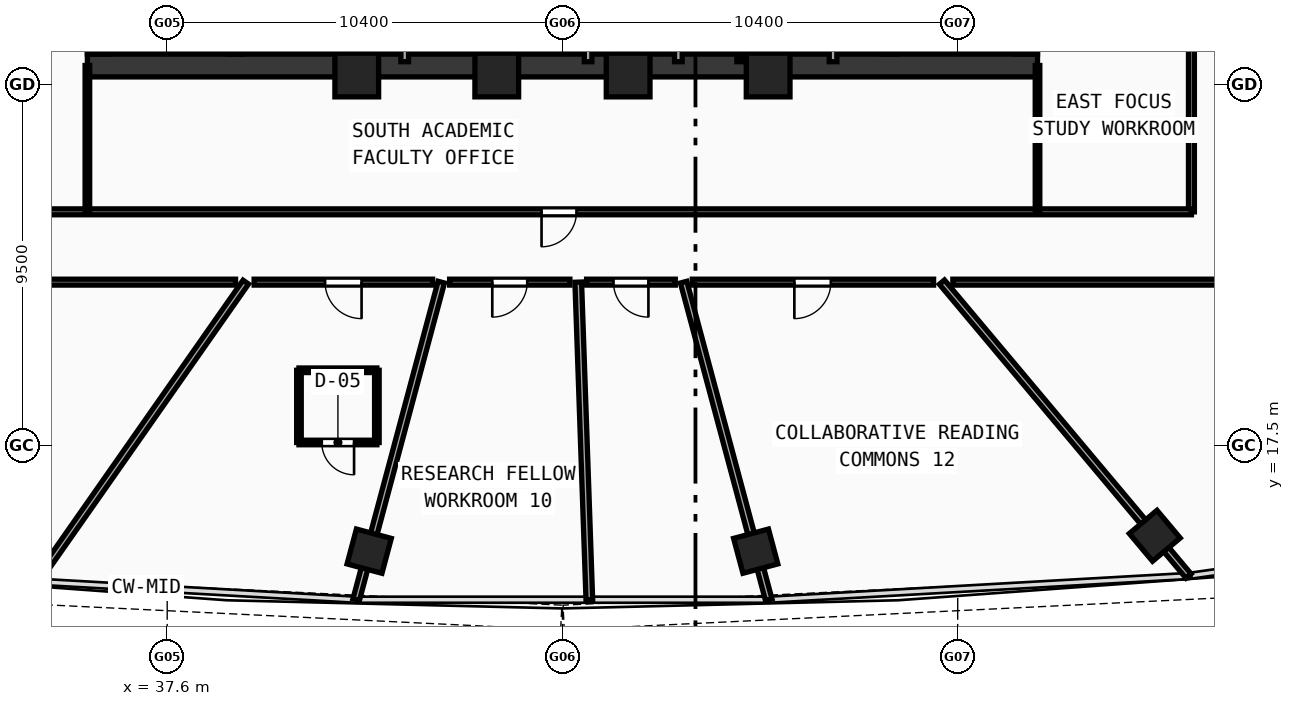
"""IFC4 building model, lengths in metres.
Left out: names, types, materials, properties, quantities, classifications, styles, units other than length and angle.
Written with IfcOpenShell. Run it as: python <this file> out.ifc"""

import sys

from ifc_helpers import new_model, si_unit, direction, frame, frame_2d, origin, origin_with_axes, origin_2d, place, context, subcontext, project, spatial, rectangle, hollow_rectangle, extrude, source, transform, mapped, element, fill, save


model = new_model("IFC4")
c1 = context("Model", 3, precision=1e-05, world=origin(), true_north=direction((0.0, 1.0)))
c2 = subcontext(c1, "Body", "Model", "MODEL_VIEW")
j1 = project(units=[si_unit("LENGTHUNIT", "METRE"), si_unit("PLANEANGLEUNIT", "RADIAN")], contexts=[c1])
p1 = place(None, origin())
s1 = spatial("IfcSite", under=j1, at=p1, CompositionType="ELEMENT")
p2 = place(p1, origin())
s2 = spatial("IfcBuilding", under=s1, at=p2, CompositionType="ELEMENT")
p3 = place(p2, frame((0.0, 0.0, 151.91)))
s3 = spatial("IfcBuildingStorey", under=s2, at=p3, CompositionType="ELEMENT", Elevation=151.91)
p4 = place(p3, frame((35.5, 27.5, 0.0), z_axis=(0.0, 0.0, 1.0), x_axis=(1.0, 0.0, 0.0)))
e1 = element("IfcWall", 1, at=p4, inside=s3, PredefinedType="SHEAR", context=c2, shape_type="SweptSolid", body=[
    extrude(rectangle(XDim=25.0, YDim=0.6, at=frame_2d((12.5, 0.0))), origin(), (0.0, 0.0, 1.0), 3.42),
])
for number, where, z_axis, x_axis in (
    (2, (35.8, 27.8, 0.0), (0.0, 0.0, 1.0), (0.0, 1.0, 0.0)),
    (3, (60.2, 27.8, 0.0), (0.0, 0.0, 1.0), (0.0, 1.0, 0.0)),
):
    element("IfcWall", number, at=place(p3, frame(where, z_axis=z_axis, x_axis=x_axis)), inside=s3, PredefinedType="SHEAR", context=c2, shape_type="SweptSolid", body=[
        extrude(rectangle(XDim=12.1, YDim=0.6, at=frame_2d((6.05, 0.0))), origin(), (0.0, 0.0, 1.0), 3.42),
    ])
p5 = place(p3, frame((39.4, 27.8, 0.0), z_axis=(0.0, 0.0, 1.0), x_axis=(0.0, 1.0, 0.0)))
e4 = element("IfcWall", 4, at=p5, inside=s3, PredefinedType="SHEAR", context=c2, shape_type="SweptSolid", body=[
    extrude(rectangle(XDim=12.1, YDim=0.4, at=frame_2d((6.05, 0.0))), origin(), (0.0, 0.0, 1.0), 3.42),
])
p6 = place(p5, frame((9.95, 0.0, 0.0)))
e5 = element("IfcOpeningElement", 5, at=p6, cuts=e4, PredefinedType="OPENING", context=c2, shape_type="SweptSolid", body=[
    extrude(rectangle(XDim=1.1, YDim=2.1, at=frame_2d((0.55, 1.05))), frame((0.0, 0.21, 0.0), z_axis=(0.0, -1.0, 0.0), x_axis=(1.0, 0.0, 0.0)), (0.0, 0.0, 1.0), 0.42),
])
p7 = place(p3, frame((56.6, 27.8, 0.0), z_axis=(0.0, 0.0, 1.0), x_axis=(0.0, 1.0, 0.0)))
e6 = element("IfcWall", 6, at=p7, inside=s3, PredefinedType="SHEAR", context=c2, shape_type="SweptSolid", body=[
    extrude(rectangle(XDim=12.1, YDim=0.4, at=frame_2d((6.05, 0.0))), origin(), (0.0, 0.0, 1.0), 3.42),
])
p8 = place(p7, frame((9.95, 0.0, 0.0)))
e7 = element("IfcOpeningElement", 7, at=p8, cuts=e6, PredefinedType="OPENING", context=c2, shape_type="SweptSolid", body=[
    extrude(rectangle(XDim=1.1, YDim=2.1, at=frame_2d((0.55, 1.05))), frame((0.0, 0.21, 0.0), z_axis=(0.0, -1.0, 0.0), x_axis=(1.0, 0.0, 0.0)), (0.0, 0.0, 1.0), 0.42),
])
m1 = source(origin(), c2, "Body", "SweptSolid", [
    extrude(hollow_rectangle(XDim=1.15, YDim=1.15, WallThickness=0.048, at=origin_2d()), origin(), (0.0, 0.0, 1.0), 3.68),
])
for number, where, z_axis, x_axis in (
    (8, (42.588, 27.25, -0.26), (0.0, 0.0, 1.0), (1.0, 0.0, 0.0)),
    (9, (46.272, 27.25, -0.26), (0.0, 0.0, 1.0), (1.0, 0.0, 0.0)),
    (10, (49.729, 27.25, -0.26), (0.0, 0.0, 1.0), (1.0, 0.0, 0.0)),
    (11, (53.412, 27.25, -0.26), (0.0, 0.0, 1.0), (1.0, 0.0, 0.0)),
):
    element("IfcColumn", number, at=place(p3, frame(where, z_axis=z_axis, x_axis=x_axis)), inside=s3, PredefinedType="COLUMN", context=c2, shape_type="MappedRepresentation", body=[
        mapped(m1, transform((0.0, 0.0, 0.0), scale=1.0)),
    ])
m2 = source(origin(), c2, "Body", "SweptSolid", [
    extrude(hollow_rectangle(XDim=0.95, YDim=0.95, WallThickness=0.04, at=origin_2d()), origin(), (0.0, 0.0, 1.0), 3.68),
])
for number, where, z_axis, x_axis in (
    (12, (42.915, 14.722, -0.26), (0.0, 0.0, 1.0), (0.966, -0.259, 0.0)),
    (13, (53.085, 14.722, -0.26), (0.0, 0.0, 1.0), (0.966, 0.259, 0.0)),
    (14, (63.585, 15.126, -0.26), (0.0, 0.0, 1.0), (0.766, 0.643, 0.0)),
):
    element("IfcColumn", number, at=place(p3, frame(where, z_axis=z_axis, x_axis=x_axis)), inside=s3, PredefinedType="COLUMN", context=c2, shape_type="MappedRepresentation", body=[
        mapped(m2, transform((0.0, 0.0, 0.0), scale=1.0)),
    ])
p9 = place(p3, frame((43.85, 27.6, 0.0), z_axis=(0.0, 0.0, 1.0), x_axis=(0.0, 1.0, 0.0)))
e15 = element("IfcWall", 15, at=p9, inside=s3, PredefinedType="SOLIDWALL", context=c2, shape_type="SweptSolid", body=[
    extrude(rectangle(XDim=6.22, YDim=0.2, at=frame_2d((3.11, 0.0))), origin(), (0.0, 0.0, 1.0), 3.42),
])
p10 = place(p9, frame((2.25, 0.0, 0.0)))
e16 = element("IfcOpeningElement", 16, at=p10, cuts=e15, PredefinedType="OPENING", context=c2, shape_type="SweptSolid", body=[
    extrude(rectangle(XDim=1.05, YDim=2.1, at=frame_2d((0.525, 1.05))), frame((0.0, 0.11, 0.0), z_axis=(0.0, -1.0, 0.0), x_axis=(1.0, 0.0, 0.0)), (0.0, 0.0, 1.0), 0.22),
])
p11 = place(p3, frame((53.68, 27.6, 0.0), z_axis=(0.0, 0.0, 1.0), x_axis=(0.0, 1.0, 0.0)))
e17 = element("IfcWall", 17, at=p11, inside=s3, PredefinedType="SOLIDWALL", context=c2, shape_type="SweptSolid", body=[
    extrude(rectangle(XDim=9.05, YDim=0.2, at=frame_2d((4.525, 0.0))), origin(), (0.0, 0.0, 1.0), 3.42),
])
p12 = place(p11, frame((6.9, 0.0, 0.0)))
e18 = element("IfcOpeningElement", 18, at=p12, cuts=e17, PredefinedType="OPENING", context=c2, shape_type="SweptSolid", body=[
    extrude(rectangle(XDim=1.05, YDim=2.1, at=frame_2d((0.525, 1.05))), frame((0.0, 0.11, 0.0), z_axis=(0.0, -1.0, 0.0), x_axis=(1.0, 0.0, 0.0)), (0.0, 0.0, 1.0), 0.22),
])
for number, where, z_axis, x_axis in (
    (19, (51.05, 27.6, 0.0), (0.0, 0.0, 1.0), (0.0, 1.0, 0.0)),
    (20, (46.225, 27.6, 0.0), (0.0, 0.0, 1.0), (0.0, 1.0, 0.0)),
    (21, (48.675, 27.6, 0.0), (0.0, 0.0, 1.0), (0.0, 1.0, 0.0)),
    (22, (55.12, 27.6, 0.0), (0.0, 0.0, 1.0), (0.0, 1.0, 0.0)),
):
    element("IfcWall", number, at=place(p3, frame(where, z_axis=z_axis, x_axis=x_axis)), inside=s3, PredefinedType="SOLIDWALL", context=c2, shape_type="SweptSolid", body=[
        extrude(rectangle(XDim=2.12, YDim=0.2, at=frame_2d((1.06, 0.0))), origin(), (0.0, 0.0, 1.0), 3.42),
    ])
p13 = place(p3, frame((42.32, 27.6, 0.0), z_axis=(0.0, 0.0, 1.0), x_axis=(0.0, 1.0, 0.0)))
e23 = element("IfcWall", 23, at=p13, inside=s3, PredefinedType="PARTITIONING", context=c2, shape_type="SweptSolid", body=[
    extrude(rectangle(XDim=5.9, YDim=0.155, at=frame_2d((2.95, 0.0))), origin(), (0.0, 0.0, 1.0), 3.42),
])
p14 = place(p13, frame((1.4, 0.0, 0.0)))
e24 = element("IfcOpeningElement", 24, at=p14, cuts=e23, PredefinedType="OPENING", context=c2, shape_type="SweptSolid", body=[
    extrude(rectangle(XDim=0.9, YDim=2.1, at=frame_2d((0.45, 1.05))), frame((0.0, 0.087, 0.0), z_axis=(0.0, -1.0, 0.0), x_axis=(1.0, 0.0, 0.0)), (0.0, 0.0, 1.0), 0.175),
])
p15 = place(p13, frame((4.45, 0.0, 0.0)))
e25 = element("IfcOpeningElement", 25, at=p15, cuts=e23, PredefinedType="OPENING", context=c2, shape_type="SweptSolid", body=[
    extrude(rectangle(XDim=0.9, YDim=2.1, at=frame_2d((0.45, 1.05))), frame((0.0, 0.087, 0.0), z_axis=(0.0, -1.0, 0.0), x_axis=(1.0, 0.0, 0.0)), (0.0, 0.0, 1.0), 0.175),
])
p16 = place(p3, frame((52.65, 27.6, 0.0), z_axis=(0.0, 0.0, 1.0), x_axis=(0.0, 1.0, 0.0)))
e26 = element("IfcWall", 26, at=p16, inside=s3, PredefinedType="PARTITIONING", context=c2, shape_type="SweptSolid", body=[
    extrude(rectangle(XDim=2.12, YDim=0.12, at=frame_2d((1.06, 0.0))), origin(), (0.0, 0.0, 1.0), 3.42),
])
p17 = place(p3, frame((64.55, 23.65, 0.0), z_axis=(0.0, 0.0, 1.0), x_axis=(0.0, 1.0, 0.0)))
e27 = element("IfcWall", 27, at=p17, inside=s3, PredefinedType="PARTITIONING", context=c2, shape_type="SweptSolid", body=[
    extrude(rectangle(XDim=16.6, YDim=0.155, at=frame_2d((8.3, 0.0))), origin(), (0.0, 0.0, 1.0), 2.77),
])
p18 = place(p17, frame((7.5, 0.0, 0.0)))
e28 = element("IfcOpeningElement", 28, at=p18, cuts=e27, PredefinedType="OPENING", context=c2, shape_type="SweptSolid", body=[
    extrude(rectangle(XDim=0.9, YDim=2.08, at=frame_2d((0.45, 1.04))), frame((0.0, 0.087, 0.0), z_axis=(0.0, -1.0, 0.0), x_axis=(1.0, 0.0, 0.0)), (0.0, 0.0, 1.0), 0.175),
])
p19 = place(p3, frame((31.45, 23.65, 0.0), z_axis=(0.0, 0.0, 1.0), x_axis=(1.0, 0.0, 0.0)))
e29 = element("IfcWall", 29, at=p19, inside=s3, PredefinedType="PARTITIONING", context=c2, shape_type="SweptSolid", body=[
    extrude(rectangle(XDim=33.1, YDim=0.155, at=frame_2d((16.55, 0.0))), origin(), (0.0, 0.0, 1.0), 2.77),
])
p20 = place(p19, frame((16.0, 0.0, 0.0)))
e30 = element("IfcOpeningElement", 30, at=p20, cuts=e29, PredefinedType="OPENING", context=c2, shape_type="SweptSolid", body=[
    extrude(rectangle(XDim=0.92, YDim=2.1, at=frame_2d((0.46, 1.05))), frame((0.0, 0.087, 0.0), z_axis=(0.0, -1.0, 0.0), x_axis=(1.0, 0.0, 0.0)), (0.0, 0.0, 1.0), 0.175),
])
for number, where, z_axis, x_axis in (
    (31, (35.5, 23.65, 0.0), (0.0, 0.0, 1.0), (0.0, 1.0, 0.0)),
    (32, (60.5, 23.65, 0.0), (0.0, 0.0, 1.0), (0.0, 1.0, 0.0)),
):
    element("IfcWall", number, at=place(p3, frame(where, z_axis=z_axis, x_axis=x_axis)), inside=s3, PredefinedType="PARTITIONING", context=c2, shape_type="SweptSolid", body=[
        extrude(rectangle(XDim=3.85, YDim=0.12, at=frame_2d((1.925, 0.0))), origin(), (0.0, 0.0, 1.0), 3.02),
    ])
p21 = place(p3, frame((39.667, 21.8, 0.0), z_axis=(0.0, 0.0, 1.0), x_axis=(-0.573578164834, -0.81915083399, 0.0)))
e33 = element("IfcWall", 33, at=p21, inside=s3, PredefinedType="PARTITIONING", context=c2, shape_type="SweptSolid", body=[
    extrude(rectangle(XDim=9.62, YDim=0.175, at=frame_2d((4.81, 0.0))), origin(), (0.0, 0.0, 1.0), 2.77),
])
p22 = place(p3, frame((44.811, 21.8, 0.0), z_axis=(0.0, 0.0, 1.0), x_axis=(-0.258790159725, -0.96593356564, 0.0)))
e34 = element("IfcWall", 34, at=p22, inside=s3, PredefinedType="PARTITIONING", context=c2, shape_type="SweptSolid", body=[
    extrude(rectangle(XDim=8.651, YDim=0.175, at=frame_2d((4.325, 0.0))), origin(), (0.0, 0.0, 1.0), 2.77),
])
p23 = place(p3, frame((48.416, 21.8, 0.0), z_axis=(0.0, 0.0, 1.0), x_axis=(0.034921859784, -0.999390045833, 0.0)))
e35 = element("IfcWall", 35, at=p23, inside=s3, PredefinedType="PARTITIONING", context=c2, shape_type="SweptSolid", body=[
    extrude(rectangle(XDim=8.361, YDim=0.175, at=frame_2d((4.181, 0.0))), origin(), (0.0, 0.0, 1.0), 2.77),
])
p24 = place(p3, frame((51.189, 21.8, 0.0), z_axis=(0.0, 0.0, 1.0), x_axis=(0.258790159725, -0.96593356564, 0.0)))
e36 = element("IfcWall", 36, at=p24, inside=s3, PredefinedType="PARTITIONING", context=c2, shape_type="SweptSolid", body=[
    extrude(rectangle(XDim=8.651, YDim=0.175, at=frame_2d((4.325, 0.0))), origin(), (0.0, 0.0, 1.0), 2.77),
])
p25 = place(p3, frame((57.985, 21.8, 0.0), z_axis=(0.0, 0.0, 1.0), x_axis=(0.642793186641, -0.766039763464, 0.0)))
e37 = element("IfcWall", 37, at=p25, inside=s3, PredefinedType="PARTITIONING", context=c2, shape_type="SweptSolid", body=[
    extrude(rectangle(XDim=10.093, YDim=0.175, at=frame_2d((5.046, 0.0))), origin(), (0.0, 0.0, 1.0), 2.77),
])
p26 = place(p3, frame((66.4, 21.8, 0.0), z_axis=(0.0, 0.0, 1.0), x_axis=(-1.0, 0.0, 0.0)))
e38 = element("IfcWall", 38, at=p26, inside=s3, PredefinedType="PARTITIONING", context=c2, shape_type="SweptSolid", body=[
    extrude(rectangle(XDim=8.127, YDim=0.155, at=frame_2d((4.064, 0.0))), origin(), (0.0, 0.0, 1.0), 3.02),
])
p27 = place(p3, frame((57.765, 21.8, 0.0), z_axis=(0.0, 0.0, 1.0), x_axis=(-1.0, 0.0, 0.0)))
e39 = element("IfcWall", 39, at=p27, inside=s3, PredefinedType="PARTITIONING", context=c2, shape_type="SweptSolid", body=[
    extrude(rectangle(XDim=6.349, YDim=0.155, at=frame_2d((3.174, 0.0))), origin(), (0.0, 0.0, 1.0), 2.77),
])
p28 = place(p27, frame((2.703, 0.0, 0.0)))
e40 = element("IfcOpeningElement", 40, at=p28, cuts=e39, PredefinedType="OPENING", context=c2, shape_type="SweptSolid", body=[
    extrude(rectangle(XDim=0.96, YDim=2.12, at=frame_2d((0.48, 1.06))), frame((0.0, 0.087, 0.0), z_axis=(0.0, -1.0, 0.0), x_axis=(1.0, 0.0, 0.0)), (0.0, 0.0, 1.0), 0.175),
])
p29 = place(p3, frame((50.969, 21.8, 0.0), z_axis=(0.0, 0.0, 1.0), x_axis=(-1.0, 0.0, 0.0)))
e41 = element("IfcWall", 41, at=p29, inside=s3, PredefinedType="PARTITIONING", context=c2, shape_type="SweptSolid", body=[
    extrude(rectangle(XDim=2.333, YDim=0.155, at=frame_2d((1.167, 0.0))), origin(), (0.0, 0.0, 1.0), 3.42),
])
p30 = place(p29, frame((0.707, 0.0, 0.0)))
e42 = element("IfcOpeningElement", 42, at=p30, cuts=e41, PredefinedType="OPENING", context=c2, shape_type="SweptSolid", body=[
    extrude(rectangle(XDim=0.92, YDim=2.1, at=frame_2d((0.46, 1.05))), frame((0.0, 0.087, 0.0), z_axis=(0.0, -1.0, 0.0), x_axis=(1.0, 0.0, 0.0)), (0.0, 0.0, 1.0), 0.175),
])
p31 = place(p3, frame((48.196, 21.8, 0.0), z_axis=(0.0, 0.0, 1.0), x_axis=(-1.0, 0.0, 0.0)))
e43 = element("IfcWall", 43, at=p31, inside=s3, PredefinedType="PARTITIONING", context=c2, shape_type="SweptSolid", body=[
    extrude(rectangle(XDim=3.165, YDim=0.155, at=frame_2d((1.582, 0.0))), origin(), (0.0, 0.0, 1.0), 3.42),
])
p32 = place(p31, frame((1.122, 0.0, 0.0)))
e44 = element("IfcOpeningElement", 44, at=p32, cuts=e43, PredefinedType="OPENING", context=c2, shape_type="SweptSolid", body=[
    extrude(rectangle(XDim=0.92, YDim=2.1, at=frame_2d((0.46, 1.05))), frame((0.0, 0.087, 0.0), z_axis=(0.0, -1.0, 0.0), x_axis=(1.0, 0.0, 0.0)), (0.0, 0.0, 1.0), 0.175),
])
p33 = place(p3, frame((44.583, 21.8, 0.0), z_axis=(0.0, 0.0, 1.0), x_axis=(-1.0, 0.0, 0.0)))
e45 = element("IfcWall", 45, at=p33, inside=s3, PredefinedType="PARTITIONING", context=c2, shape_type="SweptSolid", body=[
    extrude(rectangle(XDim=4.696, YDim=0.155, at=frame_2d((2.348, 0.0))), origin(), (0.0, 0.0, 1.0), 3.42),
])
p34 = place(p33, frame((1.869, 0.0, 0.0)))
e46 = element("IfcOpeningElement", 46, at=p34, cuts=e45, PredefinedType="OPENING", context=c2, shape_type="SweptSolid", body=[
    extrude(rectangle(XDim=0.96, YDim=2.12, at=frame_2d((0.48, 1.06))), frame((0.0, 0.087, 0.0), z_axis=(0.0, -1.0, 0.0), x_axis=(1.0, 0.0, 0.0)), (0.0, 0.0, 1.0), 0.175),
])
p35 = place(p3, frame((39.399, 21.8, 0.0), z_axis=(0.0, 0.0, 1.0), x_axis=(-1.0, 0.0, 0.0)))
e47 = element("IfcWall", 47, at=p35, inside=s3, PredefinedType="PARTITIONING", context=c2, shape_type="SweptSolid", body=[
    extrude(rectangle(XDim=9.799, YDim=0.155, at=frame_2d((4.899, 0.0))), origin(), (0.0, 0.0, 1.0), 2.77),
])
p36 = place(p3, frame((41.067, 17.581, 0.0), z_axis=(0.0, 0.0, 1.0), x_axis=(1.0, 0.0, 0.0)))
e48 = element("IfcWall", 48, at=p36, inside=s3, PredefinedType="PARTITIONING", context=c2, shape_type="SweptSolid", body=[
    extrude(rectangle(XDim=2.05, YDim=0.12, at=frame_2d((1.025, 0.0))), origin(), (0.0, 0.0, 1.0), 3.42),
])
p37 = place(p36, frame((0.6, 0.0, 0.0)))
e49 = element("IfcOpeningElement", 49, at=p37, cuts=e48, PredefinedType="OPENING", context=c2, shape_type="SweptSolid", body=[
    extrude(rectangle(XDim=0.85, YDim=2.1, at=frame_2d((0.425, 1.05))), frame((0.0, 0.07, 0.0), z_axis=(0.0, -1.0, 0.0), x_axis=(1.0, 0.0, 0.0)), (0.0, 0.0, 1.0), 0.14),
])
p38 = place(p3, frame((43.117, 17.581, 0.0), z_axis=(0.0, 0.0, 1.0), x_axis=(0.0, 1.0, 0.0)))
e50 = element("IfcWall", 50, at=p38, inside=s3, PredefinedType="PARTITIONING", context=c2, shape_type="SweptSolid", body=[
    extrude(rectangle(XDim=1.9, YDim=0.12, at=frame_2d((0.95, 0.0))), origin(), (0.0, 0.0, 1.0), 3.02),
])
p39 = place(p3, frame((43.117, 19.481, 0.0), z_axis=(0.0, 0.0, 1.0), x_axis=(-1.0, 0.0, 0.0)))
e51 = element("IfcWall", 51, at=p39, inside=s3, PredefinedType="PARTITIONING", context=c2, shape_type="SweptSolid", body=[
    extrude(rectangle(XDim=2.05, YDim=0.12, at=frame_2d((1.025, 0.0))), origin(), (0.0, 0.0, 1.0), 3.42),
])
p40 = place(p3, frame((41.067, 19.481, 0.0), z_axis=(0.0, 0.0, 1.0), x_axis=(0.0, -1.0, 0.0)))
e52 = element("IfcWall", 52, at=p40, inside=s3, PredefinedType="PARTITIONING", context=c2, shape_type="SweptSolid", body=[
    extrude(rectangle(XDim=1.9, YDim=0.12, at=frame_2d((0.95, 0.0))), origin(), (0.0, 0.0, 1.0), 3.02),
])
m3 = source(origin(), c2, "Body", "SweptSolid", [
    extrude(rectangle(XDim=0.92, YDim=2.1, at=frame_2d((0.46, 1.05))), frame((0.0, 0.025, 0.0), z_axis=(0.0, -1.0, 0.0), x_axis=(1.0, 0.0, 0.0)), (0.0, 0.0, 1.0), 0.05),
])
p41 = place(p20, frame((0.92, 0.0, 0.0), z_axis=(0.0, 0.0, 1.0), x_axis=(-1.0, 0.0, 0.0)))
e53 = element("IfcDoor", 53, at=p41, inside=s3, OperationType="SINGLE_SWING_RIGHT", PredefinedType="DOOR", context=c2, shape_type="MappedRepresentation", body=[
    mapped(m3, transform((0.0, 0.0, 0.0), scale=1.0)),
])
fill(e30, e53)
m4 = source(origin(), c2, "Body", "SweptSolid", [
    extrude(rectangle(XDim=0.96, YDim=2.12, at=frame_2d((0.48, 1.06))), frame((0.0, 0.025, 0.0), z_axis=(0.0, -1.0, 0.0), x_axis=(1.0, 0.0, 0.0)), (0.0, 0.0, 1.0), 0.05),
])
p42 = place(p34, origin_with_axes())
e54 = element("IfcDoor", 54, at=p42, inside=s3, OperationType="SINGLE_SWING_LEFT", PredefinedType="DOOR", context=c2, shape_type="MappedRepresentation", body=[
    mapped(m4, transform((0.0, 0.0, 0.0), scale=1.0)),
])
fill(e46, e54)
m5 = source(origin(), c2, "Body", "SweptSolid", [
    extrude(rectangle(XDim=0.85, YDim=2.1, at=frame_2d((0.425, 1.05))), frame((0.0, 0.025, 0.0), z_axis=(0.0, -1.0, 0.0), x_axis=(1.0, 0.0, 0.0)), (0.0, 0.0, 1.0), 0.05),
])
p43 = place(p37, frame((0.85, 0.0, 0.0), z_axis=(0.0, 0.0, 1.0), x_axis=(-1.0, 0.0, 0.0)))
e55 = element("IfcDoor", 55, at=p43, inside=s3, OperationType="SINGLE_SWING_LEFT", PredefinedType="DOOR", context=c2, shape_type="MappedRepresentation", body=[
    mapped(m5, transform((0.0, 0.0, 0.0), scale=1.0)),
])
fill(e49, e55)
p44 = place(p32, origin_with_axes())
e56 = element("IfcDoor", 56, at=p44, inside=s3, OperationType="SINGLE_SWING_RIGHT", PredefinedType="DOOR", context=c2, shape_type="MappedRepresentation", body=[
    mapped(m3, transform((0.0, 0.0, 0.0), scale=1.0)),
])
fill(e44, e56)
p45 = place(p30, origin_with_axes())
e57 = element("IfcDoor", 57, at=p45, inside=s3, OperationType="SINGLE_SWING_LEFT", PredefinedType="DOOR", context=c2, shape_type="MappedRepresentation", body=[
    mapped(m3, transform((0.0, 0.0, 0.0), scale=1.0)),
])
fill(e42, e57)
p46 = place(p28, origin_with_axes())
e58 = element("IfcDoor", 58, at=p46, inside=s3, OperationType="SINGLE_SWING_RIGHT", PredefinedType="DOOR", context=c2, shape_type="MappedRepresentation", body=[
    mapped(m4, transform((0.0, 0.0, 0.0), scale=1.0)),
])
fill(e40, e58)
save(model, sys.argv[1])
